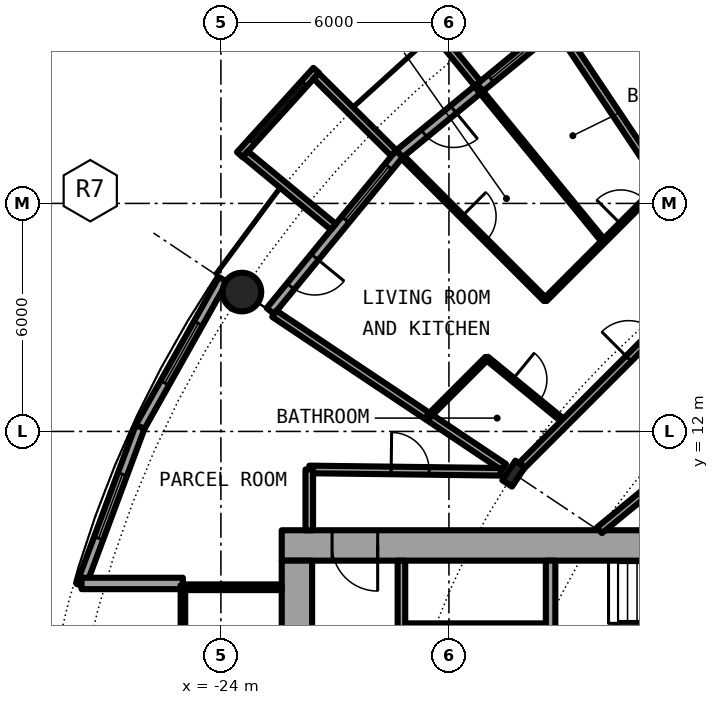
"""IFC4 building model, lengths in metres.
Left out: names, types, materials, properties, quantities, classifications, styles, units other than length and angle.
Written with IfcOpenShell. Run it as: python <this file> out.ifc"""

import sys

from ifc_helpers import new_model, si_unit, direction, frame, frame_2d, origin, origin_2d, place, context, subcontext, project, spatial, rectangle, circle, hollow_circle, i_section, extrude, element, fill, save


model = new_model("IFC4")
c1 = context("Model", 3, precision=1e-05, world=origin(), true_north=direction((0.0, 1.0)))
c2 = subcontext(c1, "Body", "Model", "MODEL_VIEW")
j1 = project(units=[si_unit("LENGTHUNIT", "METRE"), si_unit("PLANEANGLEUNIT", "RADIAN")], contexts=[c1])
p1 = place(None, origin())
s1 = spatial("IfcSite", under=j1, at=p1, CompositionType="ELEMENT")
p2 = place(p1, origin())
s2 = spatial("IfcBuilding", under=s1, at=p2, CompositionType="ELEMENT")
p3 = place(p2, frame((0.0, 0.0, 41.1)))
s3 = spatial("IfcBuildingStorey", under=s2, at=p3, CompositionType="ELEMENT", Elevation=41.1)
p4 = place(p3, frame((-23.448, 15.667, 0.0), z_axis=(0.0, 0.0, 1.0), x_axis=(1.0, 0.0, 0.0)))
e1 = element("IfcColumn", 1, at=p4, inside=s3, PredefinedType="COLUMN", context=c2, shape_type="SweptSolid", body=[
    extrude(hollow_circle(Radius=0.508, WallThickness=0.05, at=origin_2d()), origin(), (0.0, 0.0, 1.0), 3.05),
])
p5 = place(p3, frame((-16.297, 10.889, 0.0), z_axis=(0.0, 0.0, 1.0), x_axis=(-0.831469612303, 0.55557023302, 0.0)))
e2 = element("IfcColumn", 2, at=p5, inside=s3, PredefinedType="COLUMN", context=c2, shape_type="SweptSolid", body=[
    extrude(i_section(OverallWidth=0.305, OverallDepth=0.62, WebThickness=0.021, FlangeThickness=0.04, FilletRadius=0.027, at=origin_2d()), origin(), (0.0, 0.0, 1.0), 3.05),
])
p6 = place(p3, frame((-15.167, 22.699, 0.0), z_axis=(0.0, 0.0, 1.0), x_axis=(-0.773019449054, -0.634382322723, 0.0)))
e3 = element("IfcWall", 3, at=p6, inside=s3, PredefinedType="SOLIDWALL", context=c2, shape_type="SweptSolid", body=[
    extrude(rectangle(XDim=5.352, YDim=0.25, at=frame_2d((2.676, 0.0))), origin(), (0.0, 0.0, 1.0), 2.7),
])
p7 = place(p6, frame((0.441, 0.0, 0.3)))
e4 = element("IfcOpeningElement", 4, at=p7, cuts=e3, PredefinedType="OPENING", context=c2, shape_type="SweptSolid", body=[
    extrude(rectangle(XDim=1.8, YDim=2.1, at=frame_2d((0.9, 1.05))), frame((0.0, 0.135, 0.0), z_axis=(0.0, -1.0, 0.0), x_axis=(1.0, 0.0, 0.0)), (0.0, 0.0, 1.0), 0.27),
])
p8 = place(p6, frame((3.51, 0.0, 0.0)))
e5 = element("IfcOpeningElement", 5, at=p8, cuts=e3, PredefinedType="OPENING", context=c2, shape_type="SweptSolid", body=[
    extrude(rectangle(XDim=1.0, YDim=2.2, at=frame_2d((0.5, 1.1))), frame((0.0, 0.135, 0.0), z_axis=(0.0, -1.0, 0.0), x_axis=(1.0, 0.0, 0.0)), (0.0, 0.0, 1.0), 0.27),
])
p9 = place(p3, frame((-17.246, 21.155, -0.03), z_axis=(0.0, 0.0, 1.0), x_axis=(-0.631741648902, 0.775179004516, 0.0)))
e6 = element("IfcWall", 6, at=p9, inside=s3, PredefinedType="SOLIDWALL", context=c2, shape_type="SweptSolid", body=[
    extrude(rectangle(XDim=3.006, YDim=0.2, at=frame_2d((1.503, 0.0))), origin(), (0.0, 0.0, 1.0), 2.73),
])
p10 = place(p3, frame((-19.304, 19.304, 0.0), z_axis=(0.0, 0.0, 1.0), x_axis=(-0.634382322723, -0.773019449054, 0.0)))
e7 = element("IfcWall", 7, at=p10, inside=s3, PredefinedType="SOLIDWALL", context=c2, shape_type="SweptSolid", body=[
    extrude(rectangle(XDim=5.352, YDim=0.25, at=frame_2d((2.676, 0.0))), origin(), (0.0, 0.0, 1.0), 2.7),
])
p11 = place(p10, frame((0.441, 0.0, 0.3)))
e8 = element("IfcOpeningElement", 8, at=p11, cuts=e7, PredefinedType="OPENING", context=c2, shape_type="SweptSolid", body=[
    extrude(rectangle(XDim=1.8, YDim=2.1, at=frame_2d((0.9, 1.05))), frame((0.0, 0.135, 0.0), z_axis=(0.0, -1.0, 0.0), x_axis=(1.0, 0.0, 0.0)), (0.0, 0.0, 1.0), 0.27),
])
p12 = place(p10, frame((3.51, 0.0, 0.0)))
e9 = element("IfcOpeningElement", 9, at=p12, cuts=e7, PredefinedType="OPENING", context=c2, shape_type="SweptSolid", body=[
    extrude(rectangle(XDim=1.0, YDim=2.2, at=frame_2d((0.5, 1.1))), frame((0.0, 0.135, 0.0), z_axis=(0.0, -1.0, 0.0), x_axis=(1.0, 0.0, 0.0)), (0.0, 0.0, 1.0), 0.27),
])
p13 = place(p3, frame((-21.493, 21.5, -0.03), z_axis=(0.0, 0.0, 1.0), x_axis=(-0.671506829416, -0.740998365753, 0.0)))
e10 = element("IfcWall", 10, at=p13, inside=s3, PredefinedType="SOLIDWALL", context=c2, shape_type="SweptSolid", body=[
    extrude(rectangle(XDim=2.993, YDim=0.2, at=frame_2d((1.497, 0.0))), origin(), (0.0, 0.0, 1.0), 2.73),
])
p14 = place(p13, frame((0.457, 0.0, 0.33)))
e11 = element("IfcOpeningElement", 11, at=p14, cuts=e10, PredefinedType="OPENING", context=c2, shape_type="SweptSolid", body=[
    extrude(circle(Radius=1.04, at=frame_2d((1.04, 1.04))), frame((0.0, 0.11, 0.0), z_axis=(0.0, -1.0, 0.0), x_axis=(1.0, 0.0, 0.0)), (0.0, 0.0, 1.0), 0.22),
])
p15 = place(p3, frame((-19.45, 19.323, -0.03), z_axis=(0.0, 0.0, 1.0), x_axis=(-0.709727076896, 0.704476739375, 0.0)))
e12 = element("IfcWall", 12, at=p15, inside=s3, PredefinedType="SOLIDWALL", context=c2, shape_type="SweptSolid", body=[
    extrude(rectangle(XDim=2.883, YDim=0.2, at=frame_2d((1.441, 0.0))), origin(), (0.0, 0.0, 1.0), 2.73),
])
p16 = place(p3, frame((-21.041, 17.384, -0.03), z_axis=(0.0, 0.0, 1.0), x_axis=(-0.770784861449, 0.63709551667, 0.0)))
e13 = element("IfcWall", 13, at=p16, inside=s3, PredefinedType="SOLIDWALL", context=c2, shape_type="SweptSolid", body=[
    extrude(rectangle(XDim=3.006, YDim=0.2, at=frame_2d((1.503, 0.0))), origin(), (0.0, 0.0, 1.0), 2.73),
])
p17 = place(p3, frame((-23.946, 16.0, 0.0), z_axis=(0.0, 0.0, 1.0), x_axis=(-0.489696356642, -0.871893042919, 0.0)))
e14 = element("IfcWall", 14, at=p17, inside=s3, PredefinedType="SOLIDWALL", context=c2, shape_type="SweptSolid", body=[
    extrude(rectangle(XDim=4.454, YDim=0.25, at=frame_2d((2.227, 0.0))), origin(), (0.0, 0.0, 1.0), 2.7),
])
p18 = place(p17, frame((1.327, 0.0, 0.3)))
e15 = element("IfcOpeningElement", 15, at=p18, cuts=e14, PredefinedType="OPENING", context=c2, shape_type="SweptSolid", body=[
    extrude(rectangle(XDim=1.8, YDim=2.1, at=frame_2d((0.9, 1.05))), frame((0.0, 0.135, 0.0), z_axis=(0.0, -1.0, 0.0), x_axis=(1.0, 0.0, 0.0)), (0.0, 0.0, 1.0), 0.27),
])
p19 = place(p3, frame((-26.127, 12.117, 0.0), z_axis=(0.0, 0.0, 1.0), x_axis=(-0.349247811493, -0.937030397675, 0.0)))
e16 = element("IfcWall", 16, at=p19, inside=s3, PredefinedType="SOLIDWALL", context=c2, shape_type="SweptSolid", body=[
    extrude(rectangle(XDim=4.452, YDim=0.25, at=frame_2d((2.226, 0.0))), origin(), (0.0, 0.0, 1.0), 2.7),
])
p20 = place(p19, frame((1.327, 0.0, 0.3)))
e17 = element("IfcOpeningElement", 17, at=p20, cuts=e16, PredefinedType="OPENING", context=c2, shape_type="SweptSolid", body=[
    extrude(rectangle(XDim=1.8, YDim=2.1, at=frame_2d((0.9, 1.05))), frame((0.0, 0.135, 0.0), z_axis=(0.0, -1.0, 0.0), x_axis=(1.0, 0.0, 0.0)), (0.0, 0.0, 1.0), 0.27),
])
p21 = place(p3, frame((-25.0, 8.0, 0.0), z_axis=(0.0, 0.0, 1.0), x_axis=(-1.0, 0.0, 0.0)))
e18 = element("IfcWall", 18, at=p21, inside=s3, PredefinedType="SOLIDWALL", context=c2, shape_type="SweptSolid", body=[
    extrude(rectangle(XDim=2.667, YDim=0.3, at=frame_2d((1.333, 0.0))), origin(), (0.0, 0.0, 1.0), 2.7),
])
p22 = place(p3, frame((-8.2, 9.0, 0.0), z_axis=(0.0, 0.0, 1.0), x_axis=(-1.0, 0.0, 0.0)))
e19 = element("IfcWall", 19, at=p22, inside=s3, PredefinedType="SHEAR", context=c2, shape_type="SweptSolid", body=[
    extrude(rectangle(XDim=14.2, YDim=0.8, at=frame_2d((7.1, 0.0))), origin(), (0.0, 0.0, 1.0), 3.05),
])
p23 = place(p22, frame((11.675, 0.0, 0.0)))
e20 = element("IfcOpeningElement", 20, at=p23, cuts=e19, PredefinedType="OPENING", context=c2, shape_type="SweptSolid", body=[
    extrude(rectangle(XDim=1.2, YDim=2.3, at=frame_2d((0.6, 1.15))), frame((0.0, 0.41, 0.0), z_axis=(0.0, -1.0, 0.0), x_axis=(1.0, 0.0, 0.0)), (0.0, 0.0, 1.0), 0.82),
])
p24 = place(p3, frame((-22.0, -8.6, 0.0), z_axis=(0.0, 0.0, 1.0), x_axis=(0.0, 1.0, 0.0)))
e21 = element("IfcWall", 21, at=p24, inside=s3, PredefinedType="SHEAR", context=c2, shape_type="SweptSolid", body=[
    extrude(rectangle(XDim=17.2, YDim=0.8, at=frame_2d((8.6, 0.0))), origin(), (0.0, 0.0, 1.0), 3.05),
])
p25 = place(p24, frame((7.7, 0.0, 0.0)))
e22 = element("IfcOpeningElement", 22, at=p25, cuts=e21, PredefinedType="OPENING", context=c2, shape_type="SweptSolid", body=[
    extrude(rectangle(XDim=1.8, YDim=2.3, at=frame_2d((0.9, 1.15))), frame((0.0, 0.41, 0.0), z_axis=(0.0, -1.0, 0.0), x_axis=(1.0, 0.0, 0.0)), (0.0, 0.0, 1.0), 0.82),
])
p26 = place(p3, frame((-15.325, 8.6, 0.0), z_axis=(0.0, 0.0, 1.0), x_axis=(0.0, -1.0, 0.0)))
e23 = element("IfcWall", 23, at=p26, inside=s3, PredefinedType="SHEAR", context=c2, shape_type="SweptSolid", body=[
    extrude(rectangle(XDim=3.95, YDim=0.25, at=frame_2d((1.975, 0.0))), origin(), (0.0, 0.0, 1.0), 3.05),
])
p27 = place(p26, frame((2.025, 0.0, 0.0)))
e24 = element("IfcOpeningElement", 24, at=p27, cuts=e23, PredefinedType="OPENING", context=c2, shape_type="SweptSolid", body=[
    extrude(rectangle(XDim=1.2, YDim=2.3, at=frame_2d((0.6, 1.15))), frame((0.0, 0.135, 0.0), z_axis=(0.0, -1.0, 0.0), x_axis=(1.0, 0.0, 0.0)), (0.0, 0.0, 1.0), 0.27),
])
p28 = place(p3, frame((-19.25, 8.6, 0.0), z_axis=(0.0, 0.0, 1.0), x_axis=(0.0, -1.0, 0.0)))
e25 = element("IfcWall", 25, at=p28, inside=s3, PredefinedType="SOLIDWALL", context=c2, shape_type="SweptSolid", body=[
    extrude(rectangle(XDim=7.025, YDim=0.2, at=frame_2d((3.513, 0.0))), origin(), (0.0, 0.0, 1.0), 2.7),
])
p29 = place(p28, frame((2.35, 0.0, 0.0)))
e26 = element("IfcOpeningElement", 26, at=p29, cuts=e25, PredefinedType="OPENING", context=c2, shape_type="SweptSolid", body=[
    extrude(rectangle(XDim=1.1, YDim=2.3, at=frame_2d((0.55, 1.15))), frame((0.0, 0.11, 0.0), z_axis=(0.0, -1.0, 0.0), x_axis=(1.0, 0.0, 0.0)), (0.0, 0.0, 1.0), 0.22),
])
p30 = place(p3, frame((-15.45, 6.875, 0.0), z_axis=(0.0, 0.0, 1.0), x_axis=(-1.0, 0.0, 0.0)))
e27 = element("IfcWall", 27, at=p30, inside=s3, PredefinedType="PARTITIONING", context=c2, shape_type="SweptSolid", body=[
    extrude(rectangle(XDim=3.7, YDim=0.15, at=frame_2d((1.85, 0.0))), origin(), (0.0, 0.0, 1.0), 2.7),
])
p31 = place(p30, frame((1.4, 0.0, 0.0)))
e28 = element("IfcOpeningElement", 28, at=p31, cuts=e27, PredefinedType="OPENING", context=c2, shape_type="SweptSolid", body=[
    extrude(rectangle(XDim=0.9, YDim=2.3, at=frame_2d((0.45, 1.15))), frame((0.0, 0.085, 0.0), z_axis=(0.0, -1.0, 0.0), x_axis=(1.0, 0.0, 0.0)), (0.0, 0.0, 1.0), 0.17),
])
p32 = place(p3, frame((-22.4, 7.9, 0.0), z_axis=(0.0, 0.0, 1.0), x_axis=(-1.0, 0.0, 0.0)))
e29 = element("IfcWall", 29, at=p32, inside=s3, PredefinedType="PARTITIONING", context=c2, shape_type="SweptSolid", body=[
    extrude(rectangle(XDim=2.54, YDim=0.15, at=frame_2d((1.27, 0.0))), origin(), (0.0, 0.0, 1.0), 2.7),
])
p33 = place(p3, frame((-25.0, 7.95, 0.0), z_axis=(0.0, 0.0, 1.0), x_axis=(0.0, -1.0, 0.0)))
e30 = element("IfcWall", 30, at=p33, inside=s3, PredefinedType="PARTITIONING", context=c2, shape_type="SweptSolid", body=[
    extrude(rectangle(XDim=15.9, YDim=0.12, at=frame_2d((7.95, 0.0))), origin(), (0.0, 0.0, 1.0), 2.7),
])
p34 = place(p33, frame((0.95, 0.0, 0.1)))
e31 = element("IfcOpeningElement", 31, at=p34, cuts=e30, PredefinedType="OPENING", context=c2, shape_type="SweptSolid", body=[
    extrude(rectangle(XDim=14.0, YDim=2.35, at=frame_2d((7.0, 1.175))), frame((0.0, 0.07, 0.0), z_axis=(0.0, -1.0, 0.0), x_axis=(1.0, 0.0, 0.0)), (0.0, 0.0, 1.0), 0.14),
])
p35 = place(p3, frame((-22.595, 15.097, 0.0), z_axis=(0.0, 0.0, 1.0), x_axis=(0.831465568067, -0.555576285599, 0.0)))
e32 = element("IfcWall", 32, at=p35, inside=s3, PredefinedType="PARTITIONING", context=c2, shape_type="SweptSolid", body=[
    extrude(rectangle(XDim=7.264, YDim=0.2, at=frame_2d((3.632, 0.0))), origin(), (0.0, 0.0, 1.0), 2.7),
])
p36 = place(p3, frame((-19.216, 19.216, 0.0), z_axis=(0.0, 0.0, 1.0), x_axis=(0.707106781187, -0.707106781187, 0.0)))
e33 = element("IfcWall", 33, at=p36, inside=s3, PredefinedType="PARTITIONING", context=c2, shape_type="SweptSolid", body=[
    extrude(rectangle(XDim=5.305, YDim=0.1, at=frame_2d((2.652, 0.0))), origin(), (0.0, 0.0, 1.0), 2.7),
])
p37 = place(p36, frame((2.202, 0.0, 0.0)))
e34 = element("IfcOpeningElement", 34, at=p37, cuts=e33, PredefinedType="OPENING", context=c2, shape_type="SweptSolid", body=[
    extrude(rectangle(XDim=0.9, YDim=2.3, at=frame_2d((0.45, 1.15))), frame((0.0, 0.06, 0.0), z_axis=(0.0, -1.0, 0.0), x_axis=(1.0, 0.0, 0.0)), (0.0, 0.0, 1.0), 0.12),
])
p38 = place(p3, frame((-17.221, 21.022, 0.0), z_axis=(0.0, 0.0, 1.0), x_axis=(0.633662498939, -0.773609615658, 0.0)))
e35 = element("IfcWall", 35, at=p38, inside=s3, PredefinedType="PARTITIONING", context=c2, shape_type="SweptSolid", body=[
    extrude(rectangle(XDim=5.195, YDim=0.1, at=frame_2d((2.598, 0.0))), origin(), (0.0, 0.0, 1.0), 2.7),
])
p39 = place(p3, frame((-17.004, 13.927, 0.0), z_axis=(0.0, 0.0, 1.0), x_axis=(0.77367517848, -0.633582447834, 0.0)))
e36 = element("IfcWall", 36, at=p39, inside=s3, PredefinedType="PARTITIONING", context=c2, shape_type="SweptSolid", body=[
    extrude(rectangle(XDim=2.661, YDim=0.1, at=frame_2d((1.331, 0.0))), origin(), (0.0, 0.0, 1.0), 2.7),
])
p40 = place(p39, frame((0.881, 0.0, 0.0)))
e37 = element("IfcOpeningElement", 37, at=p40, cuts=e36, PredefinedType="OPENING", context=c2, shape_type="SweptSolid", body=[
    extrude(rectangle(XDim=0.9, YDim=2.3, at=frame_2d((0.45, 1.15))), frame((0.0, 0.06, 0.0), z_axis=(0.0, -1.0, 0.0), x_axis=(1.0, 0.0, 0.0)), (0.0, 0.0, 1.0), 0.12),
])
p41 = place(p3, frame((-15.097, 22.595, 0.0), z_axis=(0.0, 0.0, 1.0), x_axis=(0.555576285599, -0.831465568067, 0.0)))
e38 = element("IfcWall", 38, at=p41, inside=s3, PredefinedType="PARTITIONING", context=c2, shape_type="SweptSolid", body=[
    extrude(rectangle(XDim=7.264, YDim=0.2, at=frame_2d((3.632, 0.0))), origin(), (0.0, 0.0, 1.0), 2.7),
])
p42 = place(p3, frame((-21.675, 11.0, 0.0), z_axis=(0.0, 0.0, 1.0), x_axis=(0.99992425795, -0.012307654658, 0.0)))
e39 = element("IfcWall", 39, at=p42, inside=s3, PredefinedType="PARTITIONING", context=c2, shape_type="SweptSolid", body=[
    extrude(rectangle(XDim=5.039, YDim=0.2, at=frame_2d((2.519, 0.0))), origin(), (0.0, 0.0, 1.0), 2.7),
])
p43 = place(p42, frame((2.155, 0.0, 0.0)))
e40 = element("IfcOpeningElement", 40, at=p43, cuts=e39, PredefinedType="OPENING", context=c2, shape_type="SweptSolid", body=[
    extrude(rectangle(XDim=1.0, YDim=2.3, at=frame_2d((0.5, 1.15))), frame((0.0, 0.11, 0.0), z_axis=(0.0, -1.0, 0.0), x_axis=(1.0, 0.0, 0.0)), (0.0, 0.0, 1.0), 0.22),
])
p44 = place(p3, frame((-14.039, 9.4, 0.0), z_axis=(0.0, 0.0, 1.0), x_axis=(0.77298340166, 0.634426245326, 0.0)))
e41 = element("IfcWall", 41, at=p44, inside=s3, PredefinedType="PARTITIONING", context=c2, shape_type="SweptSolid", body=[
    extrude(rectangle(XDim=9.793, YDim=0.2, at=frame_2d((4.896, 0.0))), origin(), (0.0, 0.0, 1.0), 2.7),
])
p45 = place(p44, frame((4.389, 0.0, 0.0)))
e42 = element("IfcOpeningElement", 42, at=p45, cuts=e41, PredefinedType="OPENING", context=c2, shape_type="SweptSolid", body=[
    extrude(rectangle(XDim=1.0, YDim=2.3, at=frame_2d((0.5, 1.15))), frame((0.0, 0.11, 0.0), z_axis=(0.0, -1.0, 0.0), x_axis=(1.0, 0.0, 0.0)), (0.0, 0.0, 1.0), 0.22),
])
p46 = place(p3, frame((-16.187, 10.999, 0.0), z_axis=(0.0, 0.0, 1.0), x_axis=(0.707106781187, 0.707106781187, 0.0)))
e43 = element("IfcWall", 43, at=p46, inside=s3, PredefinedType="PARTITIONING", context=c2, shape_type="SweptSolid", body=[
    extrude(rectangle(XDim=7.337, YDim=0.2, at=frame_2d((3.668, 0.0))), origin(), (0.0, 0.0, 1.0), 2.38),
])
p47 = place(p46, frame((4.124, 0.0, 0.0)))
e44 = element("IfcOpeningElement", 44, at=p47, cuts=e43, PredefinedType="OPENING", context=c2, shape_type="SweptSolid", body=[
    extrude(rectangle(XDim=1.0, YDim=2.3, at=frame_2d((0.5, 1.15))), frame((0.0, 0.11, 0.0), z_axis=(0.0, -1.0, 0.0), x_axis=(1.0, 0.0, 0.0)), (0.0, 0.0, 1.0), 0.22),
])
p48 = place(p3, frame((-21.675, 9.4, 0.0), z_axis=(0.0, 0.0, 1.0), x_axis=(0.0, 1.0, 0.0)))
e45 = element("IfcWall", 45, at=p48, inside=s3, PredefinedType="PARTITIONING", context=c2, shape_type="SweptSolid", body=[
    extrude(rectangle(XDim=1.6, YDim=0.2, at=frame_2d((0.8, 0.0))), origin(), (0.0, 0.0, 1.0), 2.7),
])
p49 = place(p3, frame((-18.542, 12.389, 0.0), z_axis=(0.0, 0.0, 1.0), x_axis=(0.707106781187, 0.707106781187, 0.0)))
e46 = element("IfcWall", 46, at=p49, inside=s3, PredefinedType="PARTITIONING", context=c2, shape_type="SweptSolid", body=[
    extrude(rectangle(XDim=2.175, YDim=0.1, at=frame_2d((1.088, 0.0))), origin(), (0.0, 0.0, 1.0), 2.7),
])
p50 = place(p3, frame((-15.465, 15.465, 0.0), z_axis=(0.0, 0.0, 1.0), x_axis=(0.707022606819, 0.707190945535, 0.0)))
e47 = element("IfcWall", 47, at=p50, inside=s3, PredefinedType="PARTITIONING", context=c2, shape_type="SweptSolid", body=[
    extrude(rectangle(XDim=4.351, YDim=0.1, at=frame_2d((2.175, 0.0))), origin(), (0.0, 0.0, 1.0), 2.7),
])
p51 = place(p50, frame((2.813, 0.0, 0.0)))
e48 = element("IfcOpeningElement", 48, at=p51, cuts=e47, PredefinedType="OPENING", context=c2, shape_type="SweptSolid", body=[
    extrude(rectangle(XDim=0.9, YDim=2.3, at=frame_2d((0.45, 1.15))), frame((0.0, 0.06, 0.0), z_axis=(0.0, -1.0, 0.0), x_axis=(1.0, 0.0, 0.0)), (0.0, 0.0, 1.0), 0.12),
])
p52 = place(p7, origin())
e49 = element("IfcWindow", 49, at=p52, inside=s3, PartitioningType="SINGLE_PANEL", PredefinedType="WINDOW", context=c2, shape_type="SweptSolid", body=[
    extrude(rectangle(XDim=1.8, YDim=2.1, at=frame_2d((0.9, 1.05))), frame((0.0, 0.03, 0.0), z_axis=(0.0, -1.0, 0.0), x_axis=(1.0, 0.0, 0.0)), (0.0, 0.0, 1.0), 0.06),
])
fill(e4, e49)
p53 = place(p8, origin())
e50 = element("IfcDoor", 50, at=p53, inside=s3, OperationType="SINGLE_SWING_LEFT", PredefinedType="DOOR", context=c2, shape_type="SweptSolid", body=[
    extrude(rectangle(XDim=1.0, YDim=2.2, at=frame_2d((0.5, 1.1))), frame((0.0, 0.025, 0.0), z_axis=(0.0, -1.0, 0.0), x_axis=(1.0, 0.0, 0.0)), (0.0, 0.0, 1.0), 0.05),
])
fill(e5, e50)
p54 = place(p11, origin())
e51 = element("IfcWindow", 51, at=p54, inside=s3, PartitioningType="SINGLE_PANEL", PredefinedType="WINDOW", context=c2, shape_type="SweptSolid", body=[
    extrude(rectangle(XDim=1.8, YDim=2.1, at=frame_2d((0.9, 1.05))), frame((0.0, 0.03, 0.0), z_axis=(0.0, -1.0, 0.0), x_axis=(1.0, 0.0, 0.0)), (0.0, 0.0, 1.0), 0.06),
])
fill(e8, e51)
p55 = place(p14, origin())
e52 = element("IfcWindow", 52, at=p55, inside=s3, PartitioningType="SINGLE_PANEL", PredefinedType="WINDOW", context=c2, shape_type="SweptSolid", body=[
    extrude(circle(Radius=1.04, at=frame_2d((1.04, 1.04))), frame((0.0, 0.03, 0.0), z_axis=(0.0, -1.0, 0.0), x_axis=(1.0, 0.0, 0.0)), (0.0, 0.0, 1.0), 0.06),
])
fill(e11, e52)
p56 = place(p12, origin())
e53 = element("IfcDoor", 53, at=p56, inside=s3, OperationType="SINGLE_SWING_LEFT", PredefinedType="DOOR", context=c2, shape_type="SweptSolid", body=[
    extrude(rectangle(XDim=1.0, YDim=2.2, at=frame_2d((0.5, 1.1))), frame((0.0, 0.025, 0.0), z_axis=(0.0, -1.0, 0.0), x_axis=(1.0, 0.0, 0.0)), (0.0, 0.0, 1.0), 0.05),
])
fill(e9, e53)
p57 = place(p18, origin())
e54 = element("IfcWindow", 54, at=p57, inside=s3, PartitioningType="SINGLE_PANEL", PredefinedType="WINDOW", context=c2, shape_type="SweptSolid", body=[
    extrude(rectangle(XDim=1.8, YDim=2.1, at=frame_2d((0.9, 1.05))), frame((0.0, 0.03, 0.0), z_axis=(0.0, -1.0, 0.0), x_axis=(1.0, 0.0, 0.0)), (0.0, 0.0, 1.0), 0.06),
])
fill(e15, e54)
p58 = place(p20, origin())
e55 = element("IfcWindow", 55, at=p58, inside=s3, PartitioningType="SINGLE_PANEL", PredefinedType="WINDOW", context=c2, shape_type="SweptSolid", body=[
    extrude(rectangle(XDim=1.8, YDim=2.1, at=frame_2d((0.9, 1.05))), frame((0.0, 0.03, 0.0), z_axis=(0.0, -1.0, 0.0), x_axis=(1.0, 0.0, 0.0)), (0.0, 0.0, 1.0), 0.06),
])
fill(e17, e55)
p59 = place(p31, origin())
e56 = element("IfcDoor", 56, at=p59, inside=s3, OperationType="SINGLE_SWING_LEFT", PredefinedType="DOOR", context=c2, shape_type="SweptSolid", body=[
    extrude(rectangle(XDim=0.9, YDim=2.3, at=frame_2d((0.45, 1.15))), frame((0.0, 0.025, 0.0), z_axis=(0.0, -1.0, 0.0), x_axis=(1.0, 0.0, 0.0)), (0.0, 0.0, 1.0), 0.05),
])
fill(e28, e56)
p60 = place(p23, origin())
e57 = element("IfcDoor", 57, at=p60, inside=s3, OperationType="SINGLE_SWING_LEFT", PredefinedType="DOOR", context=c2, shape_type="SweptSolid", body=[
    extrude(rectangle(XDim=1.2, YDim=2.3, at=frame_2d((0.6, 1.15))), frame((0.0, 0.025, 0.0), z_axis=(0.0, -1.0, 0.0), x_axis=(1.0, 0.0, 0.0)), (0.0, 0.0, 1.0), 0.05),
])
fill(e20, e57)
p61 = place(p34, origin())
e58 = element("IfcWindow", 58, at=p61, inside=s3, PartitioningType="SINGLE_PANEL", PredefinedType="WINDOW", context=c2, shape_type="SweptSolid", body=[
    extrude(rectangle(XDim=14.0, YDim=2.35, at=frame_2d((7.0, 1.175))), frame((0.0, 0.03, 0.0), z_axis=(0.0, -1.0, 0.0), x_axis=(1.0, 0.0, 0.0)), (0.0, 0.0, 1.0), 0.06),
])
fill(e31, e58)
p62 = place(p47, origin())
e59 = element("IfcDoor", 59, at=p62, inside=s3, OperationType="SINGLE_SWING_RIGHT", PredefinedType="DOOR", context=c2, shape_type="SweptSolid", body=[
    extrude(rectangle(XDim=1.0, YDim=2.3, at=frame_2d((0.5, 1.15))), frame((0.0, 0.025, 0.0), z_axis=(0.0, -1.0, 0.0), x_axis=(1.0, 0.0, 0.0)), (0.0, 0.0, 1.0), 0.05),
])
fill(e44, e59)
p63 = place(p40, origin())
e60 = element("IfcDoor", 60, at=p63, inside=s3, OperationType="SINGLE_SWING_RIGHT", PredefinedType="DOOR", context=c2, shape_type="SweptSolid", body=[
    extrude(rectangle(XDim=0.9, YDim=2.3, at=frame_2d((0.45, 1.15))), frame((0.0, 0.025, 0.0), z_axis=(0.0, -1.0, 0.0), x_axis=(1.0, 0.0, 0.0)), (0.0, 0.0, 1.0), 0.05),
])
fill(e37, e60)
p64 = place(p37, origin())
e61 = element("IfcDoor", 61, at=p64, inside=s3, OperationType="SINGLE_SWING_LEFT", PredefinedType="DOOR", context=c2, shape_type="SweptSolid", body=[
    extrude(rectangle(XDim=0.9, YDim=2.3, at=frame_2d((0.45, 1.15))), frame((0.0, 0.025, 0.0), z_axis=(0.0, -1.0, 0.0), x_axis=(1.0, 0.0, 0.0)), (0.0, 0.0, 1.0), 0.05),
])
fill(e34, e61)
p65 = place(p51, origin())
e62 = element("IfcDoor", 62, at=p65, inside=s3, OperationType="SINGLE_SWING_RIGHT", PredefinedType="DOOR", context=c2, shape_type="SweptSolid", body=[
    extrude(rectangle(XDim=0.9, YDim=2.3, at=frame_2d((0.45, 1.15))), frame((0.0, 0.025, 0.0), z_axis=(0.0, -1.0, 0.0), x_axis=(1.0, 0.0, 0.0)), (0.0, 0.0, 1.0), 0.05),
])
fill(e48, e62)
p66 = place(p43, origin())
e63 = element("IfcDoor", 63, at=p66, inside=s3, OperationType="SINGLE_SWING_RIGHT", PredefinedType="DOOR", context=c2, shape_type="SweptSolid", body=[
    extrude(rectangle(XDim=1.0, YDim=2.3, at=frame_2d((0.5, 1.15))), frame((0.0, 0.025, 0.0), z_axis=(0.0, -1.0, 0.0), x_axis=(1.0, 0.0, 0.0)), (0.0, 0.0, 1.0), 0.05),
])
fill(e40, e63)
save(model, sys.argv[1])
